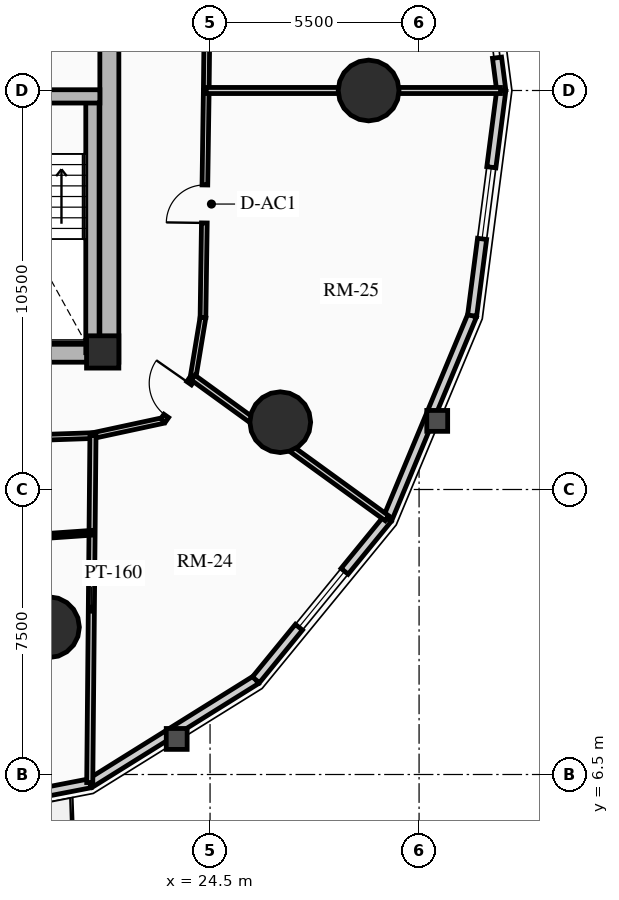
"""IFC4 building model, lengths in metres.
Left out: names, types, materials, properties, quantities, classifications, styles, units other than length and angle.
Written with IfcOpenShell. Run it as: python <this file> out.ifc"""

import sys

from ifc_helpers import new_model, si_unit, direction, frame, frame_2d, origin, origin_2d, place, context, subcontext, project, spatial, rectangle, circle, extrude, source, transform, mapped, element, fill, save


model = new_model("IFC4")
c1 = context("Model", 3, precision=1e-05, world=origin(), true_north=direction((0.0, 1.0)))
c2 = subcontext(c1, "Body", "Model", "MODEL_VIEW")
j1 = project(units=[si_unit("LENGTHUNIT", "METRE"), si_unit("PLANEANGLEUNIT", "RADIAN")], contexts=[c1])
p1 = place(None, origin())
s1 = spatial("IfcSite", under=j1, at=p1, CompositionType="ELEMENT")
p2 = place(p1, origin())
s2 = spatial("IfcBuilding", under=s1, at=p2, CompositionType="ELEMENT")
p3 = place(p2, frame((0.0, 0.0, 51.1)))
s3 = spatial("IfcBuildingStorey", under=s2, at=p3, CompositionType="ELEMENT", Elevation=51.1)
p4 = place(p3, frame((21.85, 17.35, 0.0), z_axis=(0.0, 0.0, 1.0), x_axis=(0.0, 1.0, 0.0)))
e1 = element("IfcWall", 1, at=p4, inside=s3, PredefinedType="SHEAR", context=c2, shape_type="SweptSolid", body=[
    extrude(rectangle(XDim=14.3, YDim=0.5, at=frame_2d((7.15, 0.0))), origin(), (0.0, 0.0, 1.0), 2.91),
])
p5 = place(p3, frame((11.15, 17.6, 0.0), z_axis=(0.0, 0.0, 1.0), x_axis=(1.0, 0.0, 0.0)))
e2 = element("IfcWall", 2, at=p5, inside=s3, PredefinedType="SHEAR", context=c2, shape_type="SweptSolid", body=[
    extrude(rectangle(XDim=10.7, YDim=0.5, at=frame_2d((5.35, 0.0))), origin(), (0.0, 0.0, 1.0), 2.91),
])
m1 = source(origin(), c2, "Body", "SweptSolid", [
    extrude(rectangle(XDim=1.5, YDim=2.02, at=frame_2d((0.75, 1.01))), frame((0.0, 0.26, 0.0), z_axis=(0.0, -1.0, 0.0), x_axis=(1.0, 0.0, 0.0)), (0.0, 0.0, 1.0), 0.52),
])
p6 = place(p5, frame((5.45, 0.0, 0.0)))
e3 = element("IfcOpeningElement", 3, at=p6, cuts=e2, PredefinedType="OPENING", context=c2, shape_type="MappedRepresentation", body=[
    mapped(m1, transform((0.0, 0.0, 0.0), x_axis=(1.0, 0.0, 0.0), y_axis=(0.0, 1.0, 0.0), z_axis=(0.0, 0.0, 1.0), scale=1.0)),
])
p7 = place(p3, frame((21.405, 17.6, 0.0), z_axis=(0.0, 0.0, 1.0), x_axis=(0.0, 1.0, 0.0)))
e4 = element("IfcWall", 4, at=p7, inside=s3, PredefinedType="SHEAR", context=c2, shape_type="SweptSolid", body=[
    extrude(rectangle(XDim=6.745, YDim=0.35, at=frame_2d((3.373, 0.0))), origin(), (0.0, 0.0, 1.0), 2.91),
])
p8 = place(p3, frame((18.315, 24.345, 0.0), z_axis=(0.0, 0.0, 1.0), x_axis=(1.0, 0.0, 0.0)))
e5 = element("IfcWall", 5, at=p8, inside=s3, PredefinedType="SHEAR", context=c2, shape_type="SweptSolid", body=[
    extrude(rectangle(XDim=3.285, YDim=0.35, at=frame_2d((1.643, 0.0))), origin(), (0.0, 0.0, 1.0), 2.91),
])
p9 = place(p3, frame((21.675, 17.62, 0.0), z_axis=(0.0, 0.0, 1.0), x_axis=(1.0, 0.0, 0.0)))
e6 = element("IfcColumn", 6, at=p9, inside=s3, PredefinedType="COLUMN", context=c2, shape_type="SweptSolid", body=[
    extrude(rectangle(XDim=0.85, YDim=0.85, at=origin_2d()), origin(), (0.0, 0.0, 1.0), 2.91),
])
for number, where, z_axis, x_axis in (
    (7, (28.672, 24.5, 0.0), (0.0, 0.0, 1.0), (1.0, 0.0, 0.0)),
    (8, (20.261, 10.377, 0.0), (0.0, 0.0, 1.0), (1.0, 0.0, 0.0)),
    (9, (26.347, 15.771, 0.0), (0.0, 0.0, 1.0), (1.0, 0.0, 0.0)),
):
    element("IfcColumn", number, at=place(p3, frame(where, z_axis=z_axis, x_axis=x_axis)), inside=s3, PredefinedType="USERDEFINED", context=c2, shape_type="SweptSolid", body=[
        extrude(circle(Radius=0.8, at=origin_2d()), origin(), (0.0, 0.0, 1.0), 2.91),
    ])
p10 = place(p3, frame((32.051, 25.363, 0.0), z_axis=(0.0, 0.0, 1.0), x_axis=(0.128523364007, -0.991706481225, 0.0)))
e10 = element("IfcWall", 10, at=p10, inside=s3, PredefinedType="SOLIDWALL", context=c2, shape_type="SweptSolid", body=[
    extrude(rectangle(XDim=0.87, YDim=0.24, at=frame_2d((0.435, 0.0))), origin(), (0.0, 0.0, 1.0), 2.635),
])
p11 = place(p3, frame((21.34, 6.268, 0.0), z_axis=(0.0, 0.0, 1.0), x_axis=(-0.981725274071, -0.190303668512, 0.0)))
e11 = element("IfcWall", 11, at=p11, inside=s3, PredefinedType="SOLIDWALL", context=c2, shape_type="SweptSolid", body=[
    extrude(rectangle(XDim=4.93, YDim=0.24, at=frame_2d((2.465, 0.0))), origin(), (0.0, 0.0, 1.0), 2.073),
])
m2 = source(origin(), c2, "Body", "SweptSolid", [
    extrude(rectangle(XDim=1.15, YDim=2.005, at=frame_2d((0.575, 1.002))), frame((0.0, 0.13, 0.0), z_axis=(0.0, -1.0, 0.0), x_axis=(1.0, 0.0, 0.0)), (0.0, 0.0, 1.0), 0.26),
])
p12 = place(p11, frame((1.89, 0.0, 0.0)))
e12 = element("IfcOpeningElement", 12, at=p12, cuts=e11, PredefinedType="OPENING", context=c2, shape_type="MappedRepresentation", body=[
    mapped(m2, transform((0.0, 0.0, 0.0), x_axis=(1.0, 0.0, 0.0), y_axis=(0.0, 1.0, 0.0), z_axis=(0.0, 0.0, 1.0), scale=1.0)),
])
p13 = place(p3, frame((25.707, 8.991, 0.0), z_axis=(0.0, 0.0, 1.0), x_axis=(-0.848533613342, -0.529141481107, 0.0)))
e13 = element("IfcWall", 13, at=p13, inside=s3, PredefinedType="SOLIDWALL", context=c2, shape_type="SweptSolid", body=[
    extrude(rectangle(XDim=5.146, YDim=0.24, at=frame_2d((2.573, 0.0))), origin(), (0.0, 0.0, 1.0), 2.073),
])
p14 = place(p3, frame((29.172, 13.232, 0.0), z_axis=(0.0, 0.0, 1.0), x_axis=(-0.632713287022, -0.77438614168, 0.0)))
e14 = element("IfcWall", 14, at=p14, inside=s3, PredefinedType="SOLIDWALL", context=c2, shape_type="SweptSolid", body=[
    extrude(rectangle(XDim=5.477, YDim=0.24, at=frame_2d((2.738, 0.0))), origin(), (0.0, 0.0, 1.0), 2.073),
])
m3 = source(origin(), c2, "Body", "SweptSolid", [
    extrude(rectangle(XDim=1.9, YDim=1.35, at=frame_2d((0.95, 0.675))), frame((0.0, 0.13, 0.0), z_axis=(0.0, -1.0, 0.0), x_axis=(1.0, 0.0, 0.0)), (0.0, 0.0, 1.0), 0.26),
])
p15 = place(p14, frame((1.788, 0.0, 0.65)))
e15 = element("IfcOpeningElement", 15, at=p15, cuts=e14, PredefinedType="OPENING", context=c2, shape_type="MappedRepresentation", body=[
    mapped(m3, transform((0.0, 0.0, 0.0), x_axis=(1.0, 0.0, 0.0), y_axis=(0.0, 1.0, 0.0), z_axis=(0.0, 0.0, 1.0), scale=1.0)),
])
p16 = place(p3, frame((31.396, 18.576, 0.0), z_axis=(0.0, 0.0, 1.0), x_axis=(-0.384348836956, -0.923187939442, 0.0)))
e16 = element("IfcWall", 16, at=p16, inside=s3, PredefinedType="SOLIDWALL", context=c2, shape_type="SweptSolid", body=[
    extrude(rectangle(XDim=5.789, YDim=0.24, at=frame_2d((2.894, 0.0))), origin(), (0.0, 0.0, 1.0), 2.073),
])
p17 = place(p3, frame((32.163, 24.5, 0.0), z_axis=(0.0, 0.0, 1.0), x_axis=(-0.128339641463, -0.991730274031, 0.0)))
e17 = element("IfcWall", 17, at=p17, inside=s3, PredefinedType="SOLIDWALL", context=c2, shape_type="SweptSolid", body=[
    extrude(rectangle(XDim=5.973, YDim=0.24, at=frame_2d((2.987, 0.0))), origin(), (0.0, 0.0, 1.0), 2.073),
])
p18 = place(p17, frame((2.037, 0.0, 0.65)))
e18 = element("IfcOpeningElement", 18, at=p18, cuts=e17, PredefinedType="OPENING", context=c2, shape_type="MappedRepresentation", body=[
    mapped(m3, transform((0.0, 0.0, 0.0), x_axis=(1.0, 0.0, 0.0), y_axis=(0.0, 1.0, 0.0), z_axis=(0.0, 0.0, 1.0), scale=1.0)),
])
p19 = place(p3, frame((24.4, 24.5, 0.0), z_axis=(0.0, 0.0, 1.0), x_axis=(0.011359710161, 0.999935476411, 0.0)))
e19 = element("IfcWall", 19, at=p19, inside=s3, PredefinedType="PARTITIONING", context=c2, shape_type="SweptSolid", body=[
    extrude(rectangle(XDim=6.082, YDim=0.15, at=frame_2d((3.041, 0.0))), origin(), (0.0, 0.0, 1.0), 2.159),
])
m4 = source(origin(), c2, "Body", "SweptSolid", [
    extrude(rectangle(XDim=1.05, YDim=2.015, at=frame_2d((0.525, 1.007))), frame((0.0, 0.085, 0.0), z_axis=(0.0, -1.0, 0.0), x_axis=(1.0, 0.0, 0.0)), (0.0, 0.0, 1.0), 0.17),
])
p20 = place(p19, frame((2.516, 0.0, 0.0)))
e20 = element("IfcOpeningElement", 20, at=p20, cuts=e19, PredefinedType="OPENING", context=c2, shape_type="MappedRepresentation", body=[
    mapped(m4, transform((0.0, 0.0, 0.0), x_axis=(1.0, 0.0, 0.0), y_axis=(0.0, 1.0, 0.0), z_axis=(0.0, 0.0, 1.0), scale=1.0)),
])
p21 = place(p3, frame((14.781, 15.191, 0.0), z_axis=(0.0, 0.0, 1.0), x_axis=(0.999412963972, 0.034259705842, 0.0)))
e21 = element("IfcWall", 21, at=p21, inside=s3, PredefinedType="PARTITIONING", context=c2, shape_type="SweptSolid", body=[
    extrude(rectangle(XDim=6.642, YDim=0.15, at=frame_2d((3.321, 0.0))), origin(), (0.0, 0.0, 1.0), 2.159),
])
p22 = place(p3, frame((21.419, 15.418, 0.0), z_axis=(0.0, 0.0, 1.0), x_axis=(0.977540384091, 0.210748184977, 0.0)))
e22 = element("IfcWall", 22, at=p22, inside=s3, PredefinedType="PARTITIONING", context=c2, shape_type="SweptSolid", body=[
    extrude(rectangle(XDim=1.887, YDim=0.15, at=frame_2d((0.944, 0.0))), origin(), (0.0, 0.0, 1.0), 2.205),
])
p23 = place(p3, frame((23.263, 15.816, 0.0), z_axis=(0.0, 0.0, 1.0), x_axis=(0.572652947117, 0.819797903241, 0.0)))
e23 = element("IfcWall", 23, at=p23, inside=s3, PredefinedType="PARTITIONING", context=c2, shape_type="SweptSolid", body=[
    extrude(rectangle(XDim=1.377, YDim=0.15, at=frame_2d((0.688, 0.0))), origin(), (0.0, 0.0, 1.0), 2.159),
])
p24 = place(p23, frame((0.147, 0.0, 0.0)))
e24 = element("IfcOpeningElement", 24, at=p24, cuts=e23, PredefinedType="OPENING", context=c2, shape_type="MappedRepresentation", body=[
    mapped(m4, transform((0.0, 0.0, 0.0), x_axis=(1.0, 0.0, 0.0), y_axis=(0.0, 1.0, 0.0), z_axis=(0.0, 0.0, 1.0), scale=1.0)),
])
p25 = place(p3, frame((24.052, 16.945, 0.0), z_axis=(0.0, 0.0, 1.0), x_axis=(0.162869842843, 0.986647563364, 0.0)))
e25 = element("IfcWall", 25, at=p25, inside=s3, PredefinedType="PARTITIONING", context=c2, shape_type="SweptSolid", body=[
    extrude(rectangle(XDim=1.605, YDim=0.15, at=frame_2d((0.803, 0.0))), origin(), (0.0, 0.0, 1.0), 2.205),
])
p26 = place(p3, frame((24.313, 18.529, 0.0), z_axis=(0.0, 0.0, 1.0), x_axis=(0.014472275982, 0.99989527113, 0.0)))
e26 = element("IfcWall", 26, at=p26, inside=s3, PredefinedType="PARTITIONING", context=c2, shape_type="SweptSolid", body=[
    extrude(rectangle(XDim=5.972, YDim=0.15, at=frame_2d((2.986, 0.0))), origin(), (0.0, 0.0, 1.0), 2.635),
])
m5 = source(origin(), c2, "Body", "SweptSolid", [
    extrude(rectangle(XDim=1.0, YDim=2.015, at=frame_2d((0.5, 1.007))), frame((0.0, 0.085, 0.0), z_axis=(0.0, -1.0, 0.0), x_axis=(1.0, 0.0, 0.0)), (0.0, 0.0, 1.0), 0.17),
])
p27 = place(p26, frame((2.486, 0.0, 0.0)))
e27 = element("IfcOpeningElement", 27, at=p27, cuts=e26, PredefinedType="OPENING", context=c2, shape_type="MappedRepresentation", body=[
    mapped(m5, transform((0.0, 0.0, 0.0), x_axis=(1.0, 0.0, 0.0), y_axis=(0.0, 1.0, 0.0), z_axis=(0.0, 0.0, 1.0), scale=1.0)),
])
p28 = place(p3, frame((24.4, 24.5, 0.0), z_axis=(0.0, 0.0, 1.0), x_axis=(1.0, 0.0, 0.0)))
e28 = element("IfcWall", 28, at=p28, inside=s3, PredefinedType="PARTITIONING", context=c2, shape_type="SweptSolid", body=[
    extrude(rectangle(XDim=7.743, YDim=0.16, at=frame_2d((3.872, 0.0))), origin(), (0.0, 0.0, 1.0), 2.073),
])
p29 = place(p3, frame((21.419, 15.418, 0.0), z_axis=(0.0, 0.0, 1.0), x_axis=(-0.009277675551, -0.999956961442, 0.0)))
e29 = element("IfcWall", 29, at=p29, inside=s3, PredefinedType="PARTITIONING", context=c2, shape_type="SweptSolid", body=[
    extrude(rectangle(XDim=9.131, YDim=0.16, at=frame_2d((4.566, 0.0))), origin(), (0.0, 0.0, 1.0), 2.073),
])
p30 = place(p3, frame((24.052, 16.945, 0.0), z_axis=(0.0, 0.0, 1.0), x_axis=(0.809544185493, -0.587058950817, 0.0)))
e30 = element("IfcWall", 30, at=p30, inside=s3, PredefinedType="PARTITIONING", context=c2, shape_type="SweptSolid", body=[
    extrude(rectangle(XDim=6.304, YDim=0.16, at=frame_2d((3.152, 0.0))), origin(), (0.0, 0.0, 1.0), 2.073),
])
p31 = place(p3, frame((15.262, 12.435, 0.0), z_axis=(0.0, 0.0, 1.0), x_axis=(0.997593149667, 0.069339077998, 0.0)))
e31 = element("IfcWall", 31, at=p31, inside=s3, PredefinedType="PARTITIONING", context=c2, shape_type="SweptSolid", body=[
    extrude(rectangle(XDim=6.148, YDim=0.125, at=frame_2d((3.074, 0.0))), origin(), (0.0, 0.0, 1.0), 2.159),
])
m6 = source(origin(), c2, "Body", "SweptSolid", [
    extrude(rectangle(XDim=0.9, YDim=2.005, at=frame_2d((0.45, 1.002))), frame((0.0, 0.073, 0.0), z_axis=(0.0, -1.0, 0.0), x_axis=(1.0, 0.0, 0.0)), (0.0, 0.0, 1.0), 0.145),
])
p32 = place(p31, frame((1.372, 0.0, 0.0)))
e32 = element("IfcOpeningElement", 32, at=p32, cuts=e31, PredefinedType="OPENING", context=c2, shape_type="MappedRepresentation", body=[
    mapped(m6, transform((0.0, 0.0, 0.0), x_axis=(1.0, 0.0, 0.0), y_axis=(0.0, 1.0, 0.0), z_axis=(0.0, 0.0, 1.0), scale=1.0)),
])
m7 = source(origin(), c2, "Body", "SweptSolid", [
    extrude(rectangle(XDim=1.9, YDim=1.35, at=frame_2d((0.95, 0.675))), frame((0.0, 0.03, 0.0), z_axis=(0.0, -1.0, 0.0), x_axis=(1.0, 0.0, 0.0)), (0.0, 0.0, 1.0), 0.06),
])
p33 = place(p15, origin())
e33 = element("IfcWindow", 33, at=p33, inside=s3, PartitioningType="DOUBLE_PANEL_VERTICAL", PredefinedType="WINDOW", context=c2, shape_type="MappedRepresentation", body=[
    mapped(m7, transform((0.0, 0.0, 0.0), x_axis=(1.0, 0.0, 0.0), y_axis=(0.0, 1.0, 0.0), z_axis=(0.0, 0.0, 1.0), scale=1.0)),
])
fill(e15, e33)
p34 = place(p18, origin())
e34 = element("IfcWindow", 34, at=p34, inside=s3, PartitioningType="DOUBLE_PANEL_VERTICAL", PredefinedType="WINDOW", context=c2, shape_type="MappedRepresentation", body=[
    mapped(m7, transform((0.0, 0.0, 0.0), x_axis=(1.0, 0.0, 0.0), y_axis=(0.0, 1.0, 0.0), z_axis=(0.0, 0.0, 1.0), scale=1.0)),
])
fill(e18, e34)
m8 = source(origin(), c2, "Body", "SweptSolid", [
    extrude(rectangle(XDim=1.05, YDim=2.015, at=frame_2d((0.525, 1.007))), frame((0.0, 0.025, 0.0), z_axis=(0.0, -1.0, 0.0), x_axis=(1.0, 0.0, 0.0)), (0.0, 0.0, 1.0), 0.05),
])
p35 = place(p24, origin())
e35 = element("IfcDoor", 35, at=p35, inside=s3, OperationType="SINGLE_SWING_RIGHT", PredefinedType="DOOR", context=c2, shape_type="MappedRepresentation", body=[
    mapped(m8, transform((0.0, 0.0, 0.0), x_axis=(1.0, 0.0, 0.0), y_axis=(0.0, 1.0, 0.0), z_axis=(0.0, 0.0, 1.0), scale=1.0)),
])
fill(e24, e35)
m9 = source(origin(), c2, "Body", "SweptSolid", [
    extrude(rectangle(XDim=1.0, YDim=2.015, at=frame_2d((0.5, 1.007))), frame((0.0, 0.025, 0.0), z_axis=(0.0, -1.0, 0.0), x_axis=(1.0, 0.0, 0.0)), (0.0, 0.0, 1.0), 0.05),
])
p36 = place(p27, origin())
e36 = element("IfcDoor", 36, at=p36, inside=s3, OperationType="SINGLE_SWING_LEFT", PredefinedType="DOOR", context=c2, shape_type="MappedRepresentation", body=[
    mapped(m9, transform((0.0, 0.0, 0.0), x_axis=(1.0, 0.0, 0.0), y_axis=(0.0, 1.0, 0.0), z_axis=(0.0, 0.0, 1.0), scale=1.0)),
])
fill(e27, e36)
save(model, sys.argv[1])
